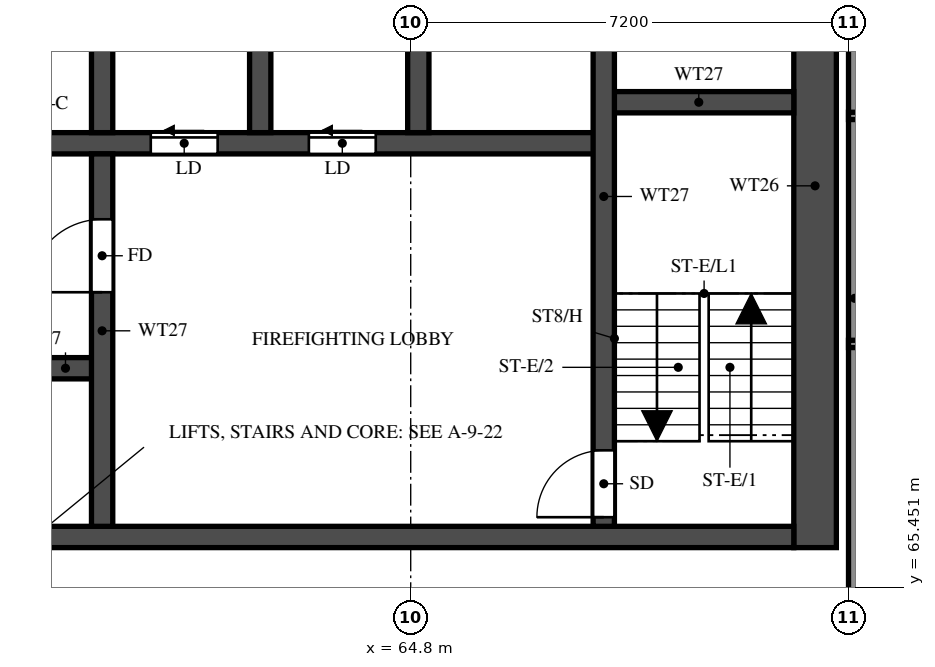
"""IFC4 building model, lengths in metres.
Left out: names, types, materials, properties, quantities, classifications, styles, units other than length and angle.
Written with IfcOpenShell. Run it as: python <this file> out.ifc"""

import sys

from ifc_helpers import new_model, si_unit, direction, frame, frame_2d, origin, place, context, subcontext, project, spatial, rectangle, extrude, element, fill, save


model = new_model("IFC4")
c1 = context("Model", 3, precision=1e-05, world=origin(), true_north=direction((0.0, 1.0)))
c2 = subcontext(c1, "Body", "Model", "MODEL_VIEW")
j1 = project(units=[si_unit("LENGTHUNIT", "METRE"), si_unit("PLANEANGLEUNIT", "RADIAN")], contexts=[c1])
p1 = place(None, origin())
s1 = spatial("IfcSite", under=j1, at=p1, CompositionType="ELEMENT")
p2 = place(p1, origin())
s2 = spatial("IfcBuilding", under=s1, at=p2, CompositionType="ELEMENT")
p3 = place(p2, frame((0.0, 0.0, 160.5)))
s3 = spatial("IfcBuildingStorey", under=s2, at=p3, CompositionType="ELEMENT", Elevation=160.5)
p4 = place(p3, frame((71.45, 66.1, 0.0), z_axis=(0.0, 0.0, 1.0), x_axis=(0.0, 1.0, 0.0)))
e1 = element("IfcWall", 1, at=p4, inside=s3, PredefinedType="SHEAR", context=c2, shape_type="SweptSolid", body=[
    extrude(rectangle(XDim=11.9, YDim=0.7, at=frame_2d((5.95, 0.0))), origin(), (0.0, 0.0, 1.0), 3.2),
])
p5 = place(p3, frame((29.7, 66.275, 0.0), z_axis=(0.0, 0.0, 1.0), x_axis=(1.0, 0.0, 0.0)))
e2 = element("IfcWall", 2, at=p5, inside=s3, PredefinedType="SHEAR", context=c2, shape_type="SweptSolid", body=[
    extrude(rectangle(XDim=41.4, YDim=0.35, at=frame_2d((20.7, 0.0))), origin(), (0.0, 0.0, 1.0), 3.2),
])
p6 = place(p5, frame((0.925, 0.0, 0.0)))
e3 = element("IfcOpeningElement", 3, at=p6, cuts=e2, PredefinedType="OPENING", context=c2, shape_type="SweptSolid", body=[
    extrude(rectangle(XDim=1.1, YDim=2.1, at=frame_2d((0.55, 1.05))), frame((0.0, 0.185, 0.0), z_axis=(0.0, -1.0, 0.0), x_axis=(1.0, 0.0, 0.0)), (0.0, 0.0, 1.0), 0.37),
])
p7 = place(p5, frame((3.712, 0.0, 0.0)))
e4 = element("IfcOpeningElement", 4, at=p7, cuts=e2, PredefinedType="OPENING", context=c2, shape_type="SweptSolid", body=[
    extrude(rectangle(XDim=1.8, YDim=2.1, at=frame_2d((0.9, 1.05))), frame((0.0, 0.185, 0.0), z_axis=(0.0, -1.0, 0.0), x_axis=(1.0, 0.0, 0.0)), (0.0, 0.0, 1.0), 0.37),
])
p8 = place(p3, frame((35.625, 69.05, 0.0), z_axis=(0.0, 0.0, 1.0), x_axis=(1.0, 0.0, 0.0)))
e5 = element("IfcWall", 5, at=p8, inside=s3, PredefinedType="SHEAR", context=c2, shape_type="SweptSolid", body=[
    extrude(rectangle(XDim=24.1, YDim=0.35, at=frame_2d((12.05, 0.0))), origin(), (0.0, 0.0, 1.0), 3.2),
])
p9 = place(p8, frame((1.0, 0.0, 0.0)))
e6 = element("IfcOpeningElement", 6, at=p9, cuts=e5, PredefinedType="OPENING", context=c2, shape_type="SweptSolid", body=[
    extrude(rectangle(XDim=1.1, YDim=2.1, at=frame_2d((0.55, 1.05))), frame((0.0, 0.185, 0.0), z_axis=(0.0, -1.0, 0.0), x_axis=(1.0, 0.0, 0.0)), (0.0, 0.0, 1.0), 0.37),
])
p10 = place(p8, frame((3.75, 0.0, 0.0)))
e7 = element("IfcOpeningElement", 7, at=p10, cuts=e5, PredefinedType="OPENING", context=c2, shape_type="SweptSolid", body=[
    extrude(rectangle(XDim=1.1, YDim=2.1, at=frame_2d((0.55, 1.05))), frame((0.0, 0.185, 0.0), z_axis=(0.0, -1.0, 0.0), x_axis=(1.0, 0.0, 0.0)), (0.0, 0.0, 1.0), 0.37),
])
p11 = place(p8, frame((6.5, 0.0, 0.0)))
e8 = element("IfcOpeningElement", 8, at=p11, cuts=e5, PredefinedType="OPENING", context=c2, shape_type="SweptSolid", body=[
    extrude(rectangle(XDim=1.1, YDim=2.1, at=frame_2d((0.55, 1.05))), frame((0.0, 0.185, 0.0), z_axis=(0.0, -1.0, 0.0), x_axis=(1.0, 0.0, 0.0)), (0.0, 0.0, 1.0), 0.37),
])
p12 = place(p8, frame((9.25, 0.0, 0.0)))
e9 = element("IfcOpeningElement", 9, at=p12, cuts=e5, PredefinedType="OPENING", context=c2, shape_type="SweptSolid", body=[
    extrude(rectangle(XDim=1.1, YDim=2.1, at=frame_2d((0.55, 1.05))), frame((0.0, 0.185, 0.0), z_axis=(0.0, -1.0, 0.0), x_axis=(1.0, 0.0, 0.0)), (0.0, 0.0, 1.0), 0.37),
])
p13 = place(p8, frame((12.0, 0.0, 0.0)))
e10 = element("IfcOpeningElement", 10, at=p13, cuts=e5, PredefinedType="OPENING", context=c2, shape_type="SweptSolid", body=[
    extrude(rectangle(XDim=1.1, YDim=2.1, at=frame_2d((0.55, 1.05))), frame((0.0, 0.185, 0.0), z_axis=(0.0, -1.0, 0.0), x_axis=(1.0, 0.0, 0.0)), (0.0, 0.0, 1.0), 0.37),
])
p14 = place(p8, frame((14.75, 0.0, 0.0)))
e11 = element("IfcOpeningElement", 11, at=p14, cuts=e5, PredefinedType="OPENING", context=c2, shape_type="SweptSolid", body=[
    extrude(rectangle(XDim=1.1, YDim=2.1, at=frame_2d((0.55, 1.05))), frame((0.0, 0.185, 0.0), z_axis=(0.0, -1.0, 0.0), x_axis=(1.0, 0.0, 0.0)), (0.0, 0.0, 1.0), 0.37),
])
p15 = place(p8, frame((17.625, 0.0, 0.0)))
e12 = element("IfcOpeningElement", 12, at=p15, cuts=e5, PredefinedType="OPENING", context=c2, shape_type="SweptSolid", body=[
    extrude(rectangle(XDim=1.1, YDim=2.1, at=frame_2d((0.55, 1.05))), frame((0.0, 0.185, 0.0), z_axis=(0.0, -1.0, 0.0), x_axis=(1.0, 0.0, 0.0)), (0.0, 0.0, 1.0), 0.37),
])
p16 = place(p8, frame((20.625, 0.0, 0.0)))
e13 = element("IfcOpeningElement", 13, at=p16, cuts=e5, PredefinedType="OPENING", context=c2, shape_type="SweptSolid", body=[
    extrude(rectangle(XDim=1.1, YDim=2.1, at=frame_2d((0.55, 1.05))), frame((0.0, 0.185, 0.0), z_axis=(0.0, -1.0, 0.0), x_axis=(1.0, 0.0, 0.0)), (0.0, 0.0, 1.0), 0.37),
])
p17 = place(p3, frame((32.825, 72.75, 0.0), z_axis=(0.0, 0.0, 1.0), x_axis=(1.0, 0.0, 0.0)))
e14 = element("IfcWall", 14, at=p17, inside=s3, PredefinedType="SHEAR", context=c2, shape_type="SweptSolid", body=[
    extrude(rectangle(XDim=35.15, YDim=0.35, at=frame_2d((17.575, 0.0))), origin(), (0.0, 0.0, 1.0), 3.2),
])
p18 = place(p17, frame((19.8, 0.0, 0.0)))
e15 = element("IfcOpeningElement", 15, at=p18, cuts=e14, PredefinedType="OPENING", context=c2, shape_type="SweptSolid", body=[
    extrude(rectangle(XDim=1.1, YDim=2.1, at=frame_2d((0.55, 1.05))), frame((0.0, 0.185, 0.0), z_axis=(0.0, -1.0, 0.0), x_axis=(1.0, 0.0, 0.0)), (0.0, 0.0, 1.0), 0.37),
])
p19 = place(p17, frame((27.7, 0.0, 0.0)))
e16 = element("IfcOpeningElement", 16, at=p19, cuts=e14, PredefinedType="OPENING", context=c2, shape_type="SweptSolid", body=[
    extrude(rectangle(XDim=1.1, YDim=2.1, at=frame_2d((0.55, 1.05))), frame((0.0, 0.185, 0.0), z_axis=(0.0, -1.0, 0.0), x_axis=(1.0, 0.0, 0.0)), (0.0, 0.0, 1.0), 0.37),
])
p20 = place(p17, frame((30.3, 0.0, 0.0)))
e17 = element("IfcOpeningElement", 17, at=p20, cuts=e14, PredefinedType="OPENING", context=c2, shape_type="SweptSolid", body=[
    extrude(rectangle(XDim=1.1, YDim=2.1, at=frame_2d((0.55, 1.05))), frame((0.0, 0.185, 0.0), z_axis=(0.0, -1.0, 0.0), x_axis=(1.0, 0.0, 0.0)), (0.0, 0.0, 1.0), 0.37),
])
p21 = place(p17, frame((3.8, 0.0, 0.0)))
e18 = element("IfcOpeningElement", 18, at=p21, cuts=e14, PredefinedType="OPENING", context=c2, shape_type="SweptSolid", body=[
    extrude(rectangle(XDim=1.1, YDim=2.1, at=frame_2d((0.55, 1.05))), frame((0.0, 0.185, 0.0), z_axis=(0.0, -1.0, 0.0), x_axis=(1.0, 0.0, 0.0)), (0.0, 0.0, 1.0), 0.37),
])
p22 = place(p17, frame((6.55, 0.0, 0.0)))
e19 = element("IfcOpeningElement", 19, at=p22, cuts=e14, PredefinedType="OPENING", context=c2, shape_type="SweptSolid", body=[
    extrude(rectangle(XDim=1.1, YDim=2.1, at=frame_2d((0.55, 1.05))), frame((0.0, 0.185, 0.0), z_axis=(0.0, -1.0, 0.0), x_axis=(1.0, 0.0, 0.0)), (0.0, 0.0, 1.0), 0.37),
])
p23 = place(p17, frame((9.3, 0.0, 0.0)))
e20 = element("IfcOpeningElement", 20, at=p23, cuts=e14, PredefinedType="OPENING", context=c2, shape_type="SweptSolid", body=[
    extrude(rectangle(XDim=1.1, YDim=2.1, at=frame_2d((0.55, 1.05))), frame((0.0, 0.185, 0.0), z_axis=(0.0, -1.0, 0.0), x_axis=(1.0, 0.0, 0.0)), (0.0, 0.0, 1.0), 0.37),
])
p24 = place(p17, frame((12.05, 0.0, 0.0)))
e21 = element("IfcOpeningElement", 21, at=p24, cuts=e14, PredefinedType="OPENING", context=c2, shape_type="SweptSolid", body=[
    extrude(rectangle(XDim=1.1, YDim=2.1, at=frame_2d((0.55, 1.05))), frame((0.0, 0.185, 0.0), z_axis=(0.0, -1.0, 0.0), x_axis=(1.0, 0.0, 0.0)), (0.0, 0.0, 1.0), 0.37),
])
p25 = place(p17, frame((14.8, 0.0, 0.0)))
e22 = element("IfcOpeningElement", 22, at=p25, cuts=e14, PredefinedType="OPENING", context=c2, shape_type="SweptSolid", body=[
    extrude(rectangle(XDim=1.1, YDim=2.1, at=frame_2d((0.55, 1.05))), frame((0.0, 0.185, 0.0), z_axis=(0.0, -1.0, 0.0), x_axis=(1.0, 0.0, 0.0)), (0.0, 0.0, 1.0), 0.37),
])
p26 = place(p17, frame((17.55, 0.0, 0.0)))
e23 = element("IfcOpeningElement", 23, at=p26, cuts=e14, PredefinedType="OPENING", context=c2, shape_type="SweptSolid", body=[
    extrude(rectangle(XDim=1.1, YDim=2.1, at=frame_2d((0.55, 1.05))), frame((0.0, 0.185, 0.0), z_axis=(0.0, -1.0, 0.0), x_axis=(1.0, 0.0, 0.0)), (0.0, 0.0, 1.0), 0.37),
])
p27 = place(p17, frame((0.938, 0.0, 0.0)))
e24 = element("IfcOpeningElement", 24, at=p27, cuts=e14, PredefinedType="OPENING", context=c2, shape_type="SweptSolid", body=[
    extrude(rectangle(XDim=1.1, YDim=2.1, at=frame_2d((0.55, 1.05))), frame((0.0, 0.185, 0.0), z_axis=(0.0, -1.0, 0.0), x_axis=(1.0, 0.0, 0.0)), (0.0, 0.0, 1.0), 0.37),
])
p28 = place(p3, frame((67.975, 73.425, 0.0), z_axis=(0.0, 0.0, 1.0), x_axis=(1.0, 0.0, 0.0)))
e25 = element("IfcWall", 25, at=p28, inside=s3, PredefinedType="SHEAR", context=c2, shape_type="SweptSolid", body=[
    extrude(rectangle(XDim=3.125, YDim=0.35, at=frame_2d((1.562, 0.0))), origin(), (0.0, 0.0, 1.0), 3.2),
])
p29 = place(p3, frame((67.975, 66.45, 0.0), z_axis=(0.0, 0.0, 1.0), x_axis=(0.0, 1.0, 0.0)))
e26 = element("IfcWall", 26, at=p29, inside=s3, PredefinedType="SHEAR", context=c2, shape_type="SweptSolid", body=[
    extrude(rectangle(XDim=10.85, YDim=0.35, at=frame_2d((5.425, 0.0))), origin(), (0.0, 0.0, 1.0), 3.2),
])
p30 = place(p29, frame((0.15, 0.0, 0.0)))
e27 = element("IfcOpeningElement", 27, at=p30, cuts=e26, PredefinedType="OPENING", context=c2, shape_type="SweptSolid", body=[
    extrude(rectangle(XDim=1.1, YDim=2.1, at=frame_2d((0.55, 1.05))), frame((0.0, 0.185, 0.0), z_axis=(0.0, -1.0, 0.0), x_axis=(1.0, 0.0, 0.0)), (0.0, 0.0, 1.0), 0.37),
])
p31 = place(p3, frame((59.725, 66.45, 0.0), z_axis=(0.0, 0.0, 1.0), x_axis=(0.0, 1.0, 0.0)))
e28 = element("IfcWall", 28, at=p31, inside=s3, PredefinedType="SHEAR", context=c2, shape_type="SweptSolid", body=[
    extrude(rectangle(XDim=6.125, YDim=0.35, at=frame_2d((3.062, 0.0))), origin(), (0.0, 0.0, 1.0), 3.2),
])
p32 = place(p31, frame((3.85, 0.0, 0.0)))
e29 = element("IfcOpeningElement", 29, at=p32, cuts=e28, PredefinedType="OPENING", context=c2, shape_type="SweptSolid", body=[
    extrude(rectangle(XDim=1.2, YDim=2.1, at=frame_2d((0.6, 1.05))), frame((0.0, 0.185, 0.0), z_axis=(0.0, -1.0, 0.0), x_axis=(1.0, 0.0, 0.0)), (0.0, 0.0, 1.0), 0.37),
])
for number, where, z_axis, x_axis in (
    (30, (59.725, 72.925, 0.0), (0.0, 0.0, 1.0), (0.0, 1.0, 0.0)),
    (31, (62.325, 72.925, 0.0), (0.0, 0.0, 1.0), (0.0, 1.0, 0.0)),
    (32, (64.925, 72.925, 0.0), (0.0, 0.0, 1.0), (0.0, 1.0, 0.0)),
):
    element("IfcWall", number, at=place(p3, frame(where, z_axis=z_axis, x_axis=x_axis)), inside=s3, PredefinedType="SHEAR", context=c2, shape_type="SweptSolid", body=[
        extrude(rectangle(XDim=2.95, YDim=0.35, at=frame_2d((1.475, 0.0))), origin(), (0.0, 0.0, 1.0), 3.2),
    ])
p33 = place(p3, frame((72.1, 62.4, 0.0), z_axis=(0.0, 0.0, 1.0), x_axis=(0.0, 1.0, 0.0)))
e33 = element("IfcWall", 33, at=p33, inside=s3, PredefinedType="SOLIDWALL", context=c2, shape_type="SweptSolid", body=[
    extrude(rectangle(XDim=15.6, YDim=0.2, at=frame_2d((7.8, 0.0))), origin(), (0.0, 0.0, 1.0), 3.2),
])
p34 = place(p3, frame((72.0, 69.45, 0.0), z_axis=(0.0, 0.0, 1.0), x_axis=(1.0, 0.0, 0.0)))
e34 = element("IfcWall", 34, at=p34, inside=s3, PredefinedType="PARTITIONING", context=c2, shape_type="SweptSolid", body=[
    extrude(rectangle(XDim=5.1, YDim=0.12, at=frame_2d((2.55, 0.0))), origin(), (0.0, 0.0, 1.0), 3.2),
])
p35 = place(p3, frame((72.0, 73.2, 0.0), z_axis=(0.0, 0.0, 1.0), x_axis=(1.0, 0.0, 0.0)))
e35 = element("IfcWall", 35, at=p35, inside=s3, PredefinedType="PARTITIONING", context=c2, shape_type="SweptSolid", body=[
    extrude(rectangle(XDim=14.275, YDim=0.12, at=frame_2d((7.137, 0.0))), origin(), (0.0, 0.0, 1.0), 2.3),
])
p36 = place(p35, frame((5.7, 0.0, 0.0)))
e36 = element("IfcOpeningElement", 36, at=p36, cuts=e35, PredefinedType="OPENING", context=c2, shape_type="SweptSolid", body=[
    extrude(rectangle(XDim=0.9, YDim=2.1, at=frame_2d((0.45, 1.05))), frame((0.0, 0.07, 0.0), z_axis=(0.0, -1.0, 0.0), x_axis=(1.0, 0.0, 0.0)), (0.0, 0.0, 1.0), 0.14),
])
p37 = place(p30, origin())
e37 = element("IfcDoor", 37, at=p37, inside=s3, OperationType="SINGLE_SWING_LEFT", PredefinedType="DOOR", context=c2, shape_type="SweptSolid", body=[
    extrude(rectangle(XDim=1.1, YDim=2.1, at=frame_2d((0.55, 1.05))), frame((0.0, 0.025, 0.0), z_axis=(0.0, -1.0, 0.0), x_axis=(1.0, 0.0, 0.0)), (0.0, 0.0, 1.0), 0.05),
])
fill(e27, e37)
p38 = place(p32, origin())
e38 = element("IfcDoor", 38, at=p38, inside=s3, OperationType="SINGLE_SWING_LEFT", PredefinedType="DOOR", context=c2, shape_type="SweptSolid", body=[
    extrude(rectangle(XDim=1.2, YDim=2.1, at=frame_2d((0.6, 1.05))), frame((0.0, 0.025, 0.0), z_axis=(0.0, -1.0, 0.0), x_axis=(1.0, 0.0, 0.0)), (0.0, 0.0, 1.0), 0.05),
])
fill(e29, e38)
p39 = place(p19, origin())
e39 = element("IfcDoor", 39, at=p39, inside=s3, OperationType="SLIDING_TO_LEFT", PredefinedType="DOOR", context=c2, shape_type="SweptSolid", body=[
    extrude(rectangle(XDim=1.1, YDim=2.1, at=frame_2d((0.55, 1.05))), frame((0.0, 0.025, 0.0), z_axis=(0.0, -1.0, 0.0), x_axis=(1.0, 0.0, 0.0)), (0.0, 0.0, 1.0), 0.05),
])
fill(e16, e39)
p40 = place(p20, origin())
e40 = element("IfcDoor", 40, at=p40, inside=s3, OperationType="SLIDING_TO_LEFT", PredefinedType="DOOR", context=c2, shape_type="SweptSolid", body=[
    extrude(rectangle(XDim=1.1, YDim=2.1, at=frame_2d((0.55, 1.05))), frame((0.0, 0.025, 0.0), z_axis=(0.0, -1.0, 0.0), x_axis=(1.0, 0.0, 0.0)), (0.0, 0.0, 1.0), 0.05),
])
fill(e17, e40)
save(model, sys.argv[1])
